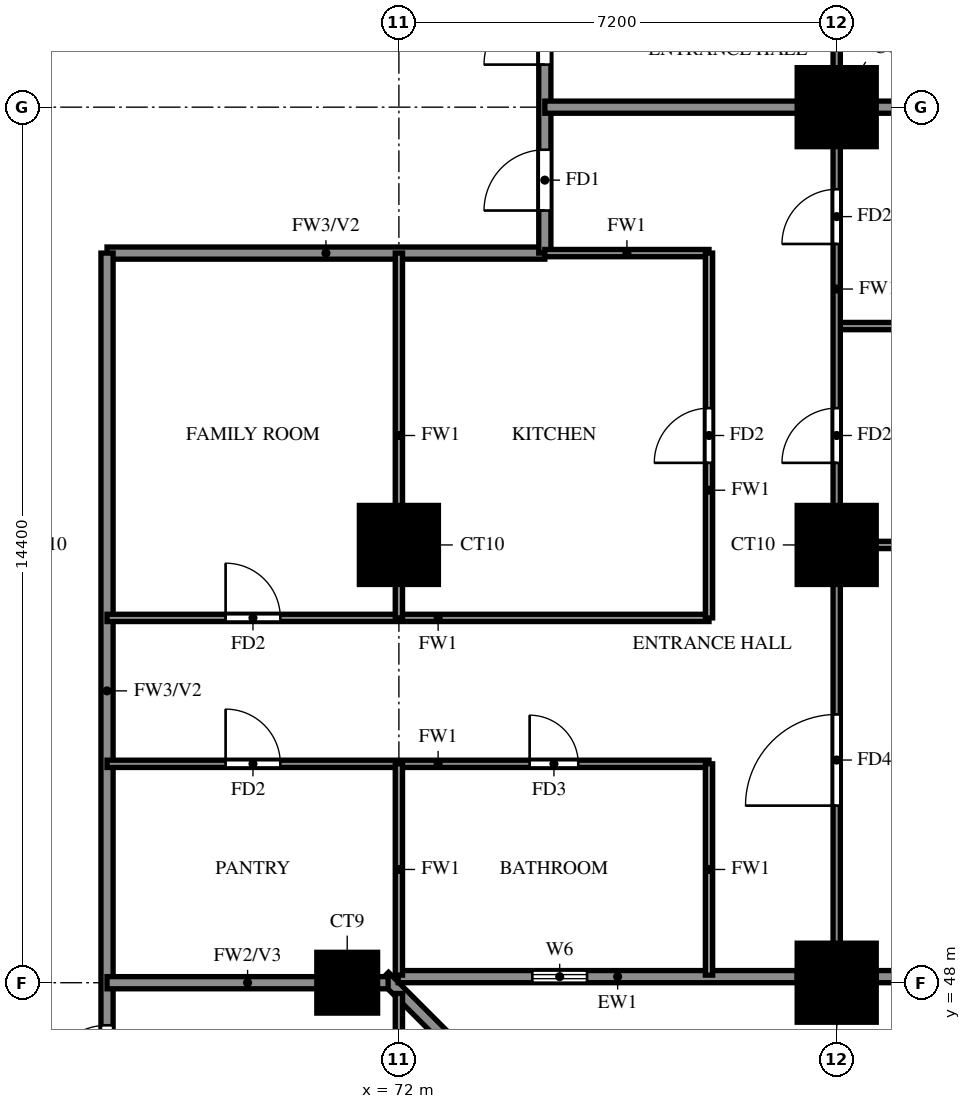
"""IFC4 building model, lengths in metres.
Left out: names, types, materials, properties, quantities, classifications, styles, units other than length and angle.
Written with IfcOpenShell. Run it as: python <this file> out.ifc"""

import sys

from ifc_helpers import new_model, si_unit, direction, frame, frame_2d, origin, origin_2d, place, context, subcontext, project, spatial, rectangle, extrude, source, transform, mapped, element, fill, save


model = new_model("IFC4")
c1 = context("Model", 3, precision=1e-05, world=origin(), true_north=direction((0.0, 1.0)))
c2 = subcontext(c1, "Body", "Model", "MODEL_VIEW")
j1 = project(units=[si_unit("LENGTHUNIT", "METRE"), si_unit("PLANEANGLEUNIT", "RADIAN")], contexts=[c1])
p1 = place(None, origin())
s1 = spatial("IfcSite", under=j1, at=p1, CompositionType="ELEMENT")
p2 = place(p1, origin())
s2 = spatial("IfcBuilding", under=s1, at=p2, CompositionType="ELEMENT")
p3 = place(p2, frame((0.0, 0.0, 72.5)))
s3 = spatial("IfcBuildingStorey", under=s2, at=p3, CompositionType="ELEMENT", Elevation=72.5)
m1 = source(origin(), c2, "Body", "SweptSolid", [
    extrude(rectangle(XDim=1.0, YDim=1.0, at=origin_2d()), origin(), (0.0, 0.0, 1.0), 3.18),
])
p4 = place(p3, frame((71.15, 48.0, 0.0), z_axis=(0.0, 0.0, 1.0), x_axis=(1.0, 0.0, 0.0)))
e1 = element("IfcColumn", 1, at=p4, inside=s3, PredefinedType="COLUMN", context=c2, shape_type="MappedRepresentation", body=[
    mapped(m1, transform((0.0, 0.0, 0.0))),
])
m2 = source(origin(), c2, "Body", "SweptSolid", [
    extrude(rectangle(XDim=1.3, YDim=1.3, at=origin_2d()), origin(), (0.0, 0.0, 1.0), 3.18),
])
for number, where, z_axis, x_axis in (
    (2, (79.2, 48.0, 0.0), (0.0, 0.0, 1.0), (1.0, 0.0, 0.0)),
    (3, (72.0, 55.2, 0.0), (0.0, 0.0, 1.0), (1.0, 0.0, 0.0)),
    (4, (79.2, 55.2, 0.0), (0.0, 0.0, 1.0), (1.0, 0.0, 0.0)),
    (5, (79.2, 62.4, 0.0), (0.0, 0.0, 1.0), (1.0, 0.0, 0.0)),
):
    element("IfcColumn", number, at=place(p3, frame(where, z_axis=z_axis, x_axis=x_axis)), inside=s3, PredefinedType="COLUMN", context=c2, shape_type="MappedRepresentation", body=[
        mapped(m2, transform((0.0, 0.0, 0.0))),
    ])
p5 = place(p3, frame((85.996, 33.863, 0.0), z_axis=(0.0, 0.0, 1.0), x_axis=(-0.707100718496, 0.707112843825, 0.0)))
e6 = element("IfcWall", 6, at=p5, inside=s3, PredefinedType="SOLIDWALL", context=c2, shape_type="SweptSolid", body=[
    extrude(rectangle(XDim=20.135, YDim=0.2, at=frame_2d((10.067, 0.0))), origin(), (0.0, 0.0, 1.0), 3.18),
])
p6 = place(p3, frame((71.989, 48.1, 0.0), z_axis=(0.0, 0.0, 1.0), x_axis=(1.0, 0.0, 0.0)))
e7 = element("IfcWall", 7, at=p6, inside=s3, PredefinedType="SOLIDWALL", context=c2, shape_type="SweptSolid", body=[
    extrude(rectangle(XDim=6.562, YDim=0.2, at=frame_2d((3.281, 0.0))), origin(), (0.0, 0.0, 1.0), 3.18),
])
p7 = place(p6, frame((2.206, 0.0, 1.5)))
e8 = element("IfcOpeningElement", 8, at=p7, cuts=e7, PredefinedType="OPENING", context=c2, shape_type="SweptSolid", body=[
    extrude(rectangle(XDim=0.9, YDim=0.9, at=frame_2d((0.45, 0.45))), frame((0.0, 0.11, 0.0), z_axis=(0.0, -1.0, 0.0), x_axis=(1.0, 0.0, 0.0)), (0.0, 0.0, 1.0), 0.22),
])
p8 = place(p3, frame((79.85, 48.1, 0.0), z_axis=(0.0, 0.0, 1.0), x_axis=(1.0, 0.0, 0.0)))
e9 = element("IfcWall", 9, at=p8, inside=s3, PredefinedType="SOLIDWALL", context=c2, shape_type="SweptSolid", body=[
    extrude(rectangle(XDim=5.45, YDim=0.2, at=frame_2d((2.725, 0.0))), origin(), (0.0, 0.0, 1.0), 3.18),
])
p9 = place(p8, frame((1.525, 0.0, 0.6)))
e10 = element("IfcOpeningElement", 10, at=p9, cuts=e9, PredefinedType="OPENING", context=c2, shape_type="SweptSolid", body=[
    extrude(rectangle(XDim=2.4, YDim=2.4, at=frame_2d((1.2, 1.2))), frame((0.0, 0.11, 0.0), z_axis=(0.0, -1.0, 0.0), x_axis=(1.0, 0.0, 0.0)), (0.0, 0.0, 1.0), 0.22),
])
p10 = place(p3, frame((67.2, 60.0, 0.0), z_axis=(0.0, 0.0, 1.0), x_axis=(1.0, 0.0, 0.0)))
e11 = element("IfcWall", 11, at=p10, inside=s3, PredefinedType="SOLIDWALL", context=c2, shape_type="SweptSolid", body=[
    extrude(rectangle(XDim=7.2, YDim=0.2, at=frame_2d((3.6, 0.0))), origin(), (0.0, 0.0, 1.0), 3.18),
])
p11 = place(p3, frame((67.2, 45.6, 0.0), z_axis=(0.0, 0.0, 1.0), x_axis=(0.0, 1.0, 0.0)))
e12 = element("IfcWall", 12, at=p11, inside=s3, PredefinedType="SOLIDWALL", context=c2, shape_type="SweptSolid", body=[
    extrude(rectangle(XDim=14.4, YDim=0.2, at=frame_2d((7.2, 0.0))), origin(), (0.0, 0.0, 1.0), 3.18),
])
p12 = place(p11, frame((0.7, 0.0, 0.0)))
e13 = element("IfcOpeningElement", 13, at=p12, cuts=e12, PredefinedType="OPENING", context=c2, shape_type="SweptSolid", body=[
    extrude(rectangle(XDim=1.0, YDim=2.1, at=frame_2d((0.5, 1.05))), frame((0.0, 0.11, 0.0), z_axis=(0.0, -1.0, 0.0), x_axis=(1.0, 0.0, 0.0)), (0.0, 0.0, 1.0), 0.22),
])
p13 = place(p3, frame((74.4, 60.0, 0.0), z_axis=(0.0, 0.0, 1.0), x_axis=(0.0, 1.0, 0.0)))
e14 = element("IfcWall", 14, at=p13, inside=s3, PredefinedType="SOLIDWALL", context=c2, shape_type="SweptSolid", body=[
    extrude(rectangle(XDim=9.45, YDim=0.2, at=frame_2d((4.725, 0.0))), origin(), (0.0, 0.0, 1.0), 3.18),
])
p14 = place(p13, frame((0.7, 0.0, 0.0)))
e15 = element("IfcOpeningElement", 15, at=p14, cuts=e14, PredefinedType="OPENING", context=c2, shape_type="SweptSolid", body=[
    extrude(rectangle(XDim=1.0, YDim=2.1, at=frame_2d((0.5, 1.05))), frame((0.0, 0.11, 0.0), z_axis=(0.0, -1.0, 0.0), x_axis=(1.0, 0.0, 0.0)), (0.0, 0.0, 1.0), 0.22),
])
p15 = place(p13, frame((3.1, 0.0, 0.0)))
e16 = element("IfcOpeningElement", 16, at=p15, cuts=e14, PredefinedType="OPENING", context=c2, shape_type="SweptSolid", body=[
    extrude(rectangle(XDim=1.0, YDim=2.1, at=frame_2d((0.5, 1.05))), frame((0.0, 0.11, 0.0), z_axis=(0.0, -1.0, 0.0), x_axis=(1.0, 0.0, 0.0)), (0.0, 0.0, 1.0), 0.22),
])
p16 = place(p3, frame((67.2, 48.0, 0.0), z_axis=(0.0, 0.0, 1.0), x_axis=(1.0, 0.0, 0.0)))
e17 = element("IfcWall", 17, at=p16, inside=s3, PredefinedType="SOLIDWALL", context=c2, shape_type="SweptSolid", body=[
    extrude(rectangle(XDim=4.623, YDim=0.2, at=frame_2d((2.312, 0.0))), origin(), (0.0, 0.0, 1.0), 3.18),
])
p17 = place(p3, frame((74.4, 62.4, 0.0), z_axis=(0.0, 0.0, 1.0), x_axis=(1.0, 0.0, 0.0)))
e18 = element("IfcWall", 18, at=p17, inside=s3, PredefinedType="SOLIDWALL", context=c2, shape_type="SweptSolid", body=[
    extrude(rectangle(XDim=11.875, YDim=0.2, at=frame_2d((5.938, 0.0))), origin(), (0.0, 0.0, 1.0), 3.18),
])
p18 = place(p3, frame((67.2, 51.6, 0.0), z_axis=(0.0, 0.0, 1.0), x_axis=(1.0, 0.0, 0.0)))
e19 = element("IfcWall", 19, at=p18, inside=s3, PredefinedType="PARTITIONING", context=c2, shape_type="SweptSolid", body=[
    extrude(rectangle(XDim=9.9, YDim=0.12, at=frame_2d((4.95, 0.0))), origin(), (0.0, 0.0, 1.0), 3.18),
])
p19 = place(p18, frame((6.95, 0.0, 0.0)))
e20 = element("IfcOpeningElement", 20, at=p19, cuts=e19, PredefinedType="OPENING", context=c2, shape_type="SweptSolid", body=[
    extrude(rectangle(XDim=0.8, YDim=2.1, at=frame_2d((0.4, 1.05))), frame((0.0, 0.07, 0.0), z_axis=(0.0, -1.0, 0.0), x_axis=(1.0, 0.0, 0.0)), (0.0, 0.0, 1.0), 0.14),
])
p20 = place(p18, frame((1.95, 0.0, 0.0)))
e21 = element("IfcOpeningElement", 21, at=p20, cuts=e19, PredefinedType="OPENING", context=c2, shape_type="SweptSolid", body=[
    extrude(rectangle(XDim=0.9, YDim=2.1, at=frame_2d((0.45, 1.05))), frame((0.0, 0.07, 0.0), z_axis=(0.0, -1.0, 0.0), x_axis=(1.0, 0.0, 0.0)), (0.0, 0.0, 1.0), 0.14),
])
p21 = place(p3, frame((67.2, 54.0, 0.0), z_axis=(0.0, 0.0, 1.0), x_axis=(1.0, 0.0, 0.0)))
e22 = element("IfcWall", 22, at=p21, inside=s3, PredefinedType="PARTITIONING", context=c2, shape_type="SweptSolid", body=[
    extrude(rectangle(XDim=9.9, YDim=0.12, at=frame_2d((4.95, 0.0))), origin(), (0.0, 0.0, 1.0), 3.18),
])
p22 = place(p21, frame((1.95, 0.0, 0.0)))
e23 = element("IfcOpeningElement", 23, at=p22, cuts=e22, PredefinedType="OPENING", context=c2, shape_type="SweptSolid", body=[
    extrude(rectangle(XDim=0.9, YDim=2.1, at=frame_2d((0.45, 1.05))), frame((0.0, 0.07, 0.0), z_axis=(0.0, -1.0, 0.0), x_axis=(1.0, 0.0, 0.0)), (0.0, 0.0, 1.0), 0.14),
])
p23 = place(p3, frame((79.2, 55.2, 0.0), z_axis=(0.0, 0.0, 1.0), x_axis=(1.0, 0.0, 0.0)))
e24 = element("IfcWall", 24, at=p23, inside=s3, PredefinedType="PARTITIONING", context=c2, shape_type="SweptSolid", body=[
    extrude(rectangle(XDim=7.075, YDim=0.12, at=frame_2d((3.538, 0.0))), origin(), (0.0, 0.0, 1.0), 3.18),
])
p24 = place(p3, frame((79.2, 58.8, 0.0), z_axis=(0.0, 0.0, 1.0), x_axis=(1.0, 0.0, 0.0)))
e25 = element("IfcWall", 25, at=p24, inside=s3, PredefinedType="PARTITIONING", context=c2, shape_type="SweptSolid", body=[
    extrude(rectangle(XDim=7.075, YDim=0.12, at=frame_2d((3.538, 0.0))), origin(), (0.0, 0.0, 1.0), 2.28),
])
p25 = place(p3, frame((74.4, 60.0, 0.0), z_axis=(0.0, 0.0, 1.0), x_axis=(1.0, 0.0, 0.0)))
e26 = element("IfcWall", 26, at=p25, inside=s3, PredefinedType="PARTITIONING", context=c2, shape_type="SweptSolid", body=[
    extrude(rectangle(XDim=2.7, YDim=0.12, at=frame_2d((1.35, 0.0))), origin(), (0.0, 0.0, 1.0), 3.18),
])
p26 = place(p3, frame((72.0, 33.725, 0.0), z_axis=(0.0, 0.0, 1.0), x_axis=(0.0, 1.0, 0.0)))
e27 = element("IfcWall", 27, at=p26, inside=s3, PredefinedType="PARTITIONING", context=c2, shape_type="SweptSolid", body=[
    extrude(rectangle(XDim=14.098, YDim=0.12, at=frame_2d((7.049, 0.0))), origin(), (0.0, 0.0, 1.0), 2.28),
])
p27 = place(p26, frame((10.075, 0.0, 0.0)))
e28 = element("IfcOpeningElement", 28, at=p27, cuts=e27, PredefinedType="OPENING", context=c2, shape_type="SweptSolid", body=[
    extrude(rectangle(XDim=0.9, YDim=2.1, at=frame_2d((0.45, 1.05))), frame((0.0, 0.07, 0.0), z_axis=(0.0, -1.0, 0.0), x_axis=(1.0, 0.0, 0.0)), (0.0, 0.0, 1.0), 0.14),
])
p28 = place(p3, frame((72.0, 48.125, 0.0), z_axis=(0.0, 0.0, 1.0), x_axis=(0.0, 1.0, 0.0)))
e29 = element("IfcWall", 29, at=p28, inside=s3, PredefinedType="PARTITIONING", context=c2, shape_type="SweptSolid", body=[
    extrude(rectangle(XDim=3.475, YDim=0.12, at=frame_2d((1.738, 0.0))), origin(), (0.0, 0.0, 1.0), 3.18),
])
p29 = place(p3, frame((72.0, 54.0, 0.0), z_axis=(0.0, 0.0, 1.0), x_axis=(0.0, 1.0, 0.0)))
e30 = element("IfcWall", 30, at=p29, inside=s3, PredefinedType="PARTITIONING", context=c2, shape_type="SweptSolid", body=[
    extrude(rectangle(XDim=6.0, YDim=0.12, at=frame_2d((3.0, 0.0))), origin(), (0.0, 0.0, 1.0), 3.18),
])
p30 = place(p3, frame((77.1, 48.125, 0.0), z_axis=(0.0, 0.0, 1.0), x_axis=(0.0, 1.0, 0.0)))
e31 = element("IfcWall", 31, at=p30, inside=s3, PredefinedType="PARTITIONING", context=c2, shape_type="SweptSolid", body=[
    extrude(rectangle(XDim=3.475, YDim=0.12, at=frame_2d((1.738, 0.0))), origin(), (0.0, 0.0, 1.0), 3.18),
])
p31 = place(p3, frame((77.1, 54.0, 0.0), z_axis=(0.0, 0.0, 1.0), x_axis=(0.0, 1.0, 0.0)))
e32 = element("IfcWall", 32, at=p31, inside=s3, PredefinedType="PARTITIONING", context=c2, shape_type="SweptSolid", body=[
    extrude(rectangle(XDim=6.0, YDim=0.12, at=frame_2d((3.0, 0.0))), origin(), (0.0, 0.0, 1.0), 3.18),
])
p32 = place(p31, frame((2.55, 0.0, 0.0)))
e33 = element("IfcOpeningElement", 33, at=p32, cuts=e32, PredefinedType="OPENING", context=c2, shape_type="SweptSolid", body=[
    extrude(rectangle(XDim=0.9, YDim=2.1, at=frame_2d((0.45, 1.05))), frame((0.0, 0.07, 0.0), z_axis=(0.0, -1.0, 0.0), x_axis=(1.0, 0.0, 0.0)), (0.0, 0.0, 1.0), 0.14),
])
p33 = place(p3, frame((79.2, 48.125, 0.0), z_axis=(0.0, 0.0, 1.0), x_axis=(0.0, 1.0, 0.0)))
e34 = element("IfcWall", 34, at=p33, inside=s3, PredefinedType="PARTITIONING", context=c2, shape_type="SweptSolid", body=[
    extrude(rectangle(XDim=25.075, YDim=0.12, at=frame_2d((12.538, 0.0))), origin(), (0.0, 0.0, 1.0), 3.18),
])
p34 = place(p33, frame((2.788, 0.0, 0.0)))
e35 = element("IfcOpeningElement", 35, at=p34, cuts=e34, PredefinedType="OPENING", context=c2, shape_type="SweptSolid", body=[
    extrude(rectangle(XDim=1.5, YDim=2.1, at=frame_2d((0.75, 1.05))), frame((0.0, 0.07, 0.0), z_axis=(0.0, -1.0, 0.0), x_axis=(1.0, 0.0, 0.0)), (0.0, 0.0, 1.0), 0.14),
])
p35 = place(p33, frame((8.425, 0.0, 0.0)))
e36 = element("IfcOpeningElement", 36, at=p35, cuts=e34, PredefinedType="OPENING", context=c2, shape_type="SweptSolid", body=[
    extrude(rectangle(XDim=0.9, YDim=2.1, at=frame_2d((0.45, 1.05))), frame((0.0, 0.07, 0.0), z_axis=(0.0, -1.0, 0.0), x_axis=(1.0, 0.0, 0.0)), (0.0, 0.0, 1.0), 0.14),
])
p36 = place(p33, frame((12.025, 0.0, 0.0)))
e37 = element("IfcOpeningElement", 37, at=p36, cuts=e34, PredefinedType="OPENING", context=c2, shape_type="SweptSolid", body=[
    extrude(rectangle(XDim=0.9, YDim=2.1, at=frame_2d((0.45, 1.05))), frame((0.0, 0.07, 0.0), z_axis=(0.0, -1.0, 0.0), x_axis=(1.0, 0.0, 0.0)), (0.0, 0.0, 1.0), 0.14),
])
p37 = place(p33, frame((15.625, 0.0, 0.0)))
e38 = element("IfcOpeningElement", 38, at=p37, cuts=e34, PredefinedType="OPENING", context=c2, shape_type="SweptSolid", body=[
    extrude(rectangle(XDim=0.9, YDim=2.1, at=frame_2d((0.45, 1.05))), frame((0.0, 0.07, 0.0), z_axis=(0.0, -1.0, 0.0), x_axis=(1.0, 0.0, 0.0)), (0.0, 0.0, 1.0), 0.14),
])
p38 = place(p33, frame((19.225, 0.0, 0.0)))
e39 = element("IfcOpeningElement", 39, at=p38, cuts=e34, PredefinedType="OPENING", context=c2, shape_type="SweptSolid", body=[
    extrude(rectangle(XDim=0.9, YDim=2.1, at=frame_2d((0.45, 1.05))), frame((0.0, 0.07, 0.0), z_axis=(0.0, -1.0, 0.0), x_axis=(1.0, 0.0, 0.0)), (0.0, 0.0, 1.0), 0.14),
])
p39 = place(p33, frame((22.825, 0.0, 0.0)))
e40 = element("IfcOpeningElement", 40, at=p39, cuts=e34, PredefinedType="OPENING", context=c2, shape_type="SweptSolid", body=[
    extrude(rectangle(XDim=0.9, YDim=2.1, at=frame_2d((0.45, 1.05))), frame((0.0, 0.07, 0.0), z_axis=(0.0, -1.0, 0.0), x_axis=(1.0, 0.0, 0.0)), (0.0, 0.0, 1.0), 0.14),
])
p40 = place(p7, origin())
e41 = element("IfcWindow", 41, at=p40, inside=s3, PartitioningType="SINGLE_PANEL", PredefinedType="WINDOW", context=c2, shape_type="SweptSolid", body=[
    extrude(rectangle(XDim=0.9, YDim=0.9, at=frame_2d((0.45, 0.45))), frame((0.0, 0.03, 0.0), z_axis=(0.0, -1.0, 0.0), x_axis=(1.0, 0.0, 0.0)), (0.0, 0.0, 1.0), 0.06),
])
fill(e8, e41)
p41 = place(p14, origin())
e42 = element("IfcDoor", 42, at=p41, inside=s3, OperationType="SINGLE_SWING_LEFT", PredefinedType="DOOR", context=c2, shape_type="SweptSolid", body=[
    extrude(rectangle(XDim=1.0, YDim=2.1, at=frame_2d((0.5, 1.05))), frame((0.0, 0.025, 0.0), z_axis=(0.0, -1.0, 0.0), x_axis=(1.0, 0.0, 0.0)), (0.0, 0.0, 1.0), 0.05),
])
fill(e15, e42)
p42 = place(p34, origin())
e43 = element("IfcDoor", 43, at=p42, inside=s3, OperationType="SINGLE_SWING_RIGHT", PredefinedType="DOOR", context=c2, shape_type="SweptSolid", body=[
    extrude(rectangle(XDim=1.5, YDim=2.1, at=frame_2d((0.75, 1.05))), frame((0.0, 0.025, 0.0), z_axis=(0.0, -1.0, 0.0), x_axis=(1.0, 0.0, 0.0)), (0.0, 0.0, 1.0), 0.05),
])
fill(e35, e43)
p43 = place(p35, origin())
e44 = element("IfcDoor", 44, at=p43, inside=s3, OperationType="SINGLE_SWING_LEFT", PredefinedType="DOOR", context=c2, shape_type="SweptSolid", body=[
    extrude(rectangle(XDim=0.9, YDim=2.1, at=frame_2d((0.45, 1.05))), frame((0.0, 0.025, 0.0), z_axis=(0.0, -1.0, 0.0), x_axis=(1.0, 0.0, 0.0)), (0.0, 0.0, 1.0), 0.05),
])
fill(e36, e44)
p44 = place(p36, origin())
e45 = element("IfcDoor", 45, at=p44, inside=s3, OperationType="SINGLE_SWING_LEFT", PredefinedType="DOOR", context=c2, shape_type="SweptSolid", body=[
    extrude(rectangle(XDim=0.9, YDim=2.1, at=frame_2d((0.45, 1.05))), frame((0.0, 0.025, 0.0), z_axis=(0.0, -1.0, 0.0), x_axis=(1.0, 0.0, 0.0)), (0.0, 0.0, 1.0), 0.05),
])
fill(e37, e45)
p45 = place(p19, origin())
e46 = element("IfcDoor", 46, at=p45, inside=s3, OperationType="SINGLE_SWING_RIGHT", PredefinedType="DOOR", context=c2, shape_type="SweptSolid", body=[
    extrude(rectangle(XDim=0.8, YDim=2.1, at=frame_2d((0.4, 1.05))), frame((0.0, 0.025, 0.0), z_axis=(0.0, -1.0, 0.0), x_axis=(1.0, 0.0, 0.0)), (0.0, 0.0, 1.0), 0.05),
])
fill(e20, e46)
p46 = place(p32, origin())
e47 = element("IfcDoor", 47, at=p46, inside=s3, OperationType="SINGLE_SWING_LEFT", PredefinedType="DOOR", context=c2, shape_type="SweptSolid", body=[
    extrude(rectangle(XDim=0.9, YDim=2.1, at=frame_2d((0.45, 1.05))), frame((0.0, 0.025, 0.0), z_axis=(0.0, -1.0, 0.0), x_axis=(1.0, 0.0, 0.0)), (0.0, 0.0, 1.0), 0.05),
])
fill(e33, e47)
p47 = place(p20, origin())
e48 = element("IfcDoor", 48, at=p47, inside=s3, OperationType="SINGLE_SWING_LEFT", PredefinedType="DOOR", context=c2, shape_type="SweptSolid", body=[
    extrude(rectangle(XDim=0.9, YDim=2.1, at=frame_2d((0.45, 1.05))), frame((0.0, 0.025, 0.0), z_axis=(0.0, -1.0, 0.0), x_axis=(1.0, 0.0, 0.0)), (0.0, 0.0, 1.0), 0.05),
])
fill(e21, e48)
p48 = place(p22, origin())
e49 = element("IfcDoor", 49, at=p48, inside=s3, OperationType="SINGLE_SWING_RIGHT", PredefinedType="DOOR", context=c2, shape_type="SweptSolid", body=[
    extrude(rectangle(XDim=0.9, YDim=2.1, at=frame_2d((0.45, 1.05))), frame((0.0, 0.025, 0.0), z_axis=(0.0, -1.0, 0.0), x_axis=(1.0, 0.0, 0.0)), (0.0, 0.0, 1.0), 0.05),
])
fill(e23, e49)
p49 = place(p15, origin())
e50 = element("IfcDoor", 50, at=p49, inside=s3, OperationType="SINGLE_SWING_LEFT", PredefinedType="DOOR", context=c2, shape_type="SweptSolid", body=[
    extrude(rectangle(XDim=1.0, YDim=2.1, at=frame_2d((0.5, 1.05))), frame((0.0, 0.025, 0.0), z_axis=(0.0, -1.0, 0.0), x_axis=(1.0, 0.0, 0.0)), (0.0, 0.0, 1.0), 0.05),
])
fill(e16, e50)
p50 = place(p12, origin())
e51 = element("IfcDoor", 51, at=p50, inside=s3, OperationType="SINGLE_SWING_LEFT", PredefinedType="DOOR", context=c2, shape_type="SweptSolid", body=[
    extrude(rectangle(XDim=1.0, YDim=2.1, at=frame_2d((0.5, 1.05))), frame((0.0, 0.025, 0.0), z_axis=(0.0, -1.0, 0.0), x_axis=(1.0, 0.0, 0.0)), (0.0, 0.0, 1.0), 0.05),
])
fill(e13, e51)
save(model, sys.argv[1])
